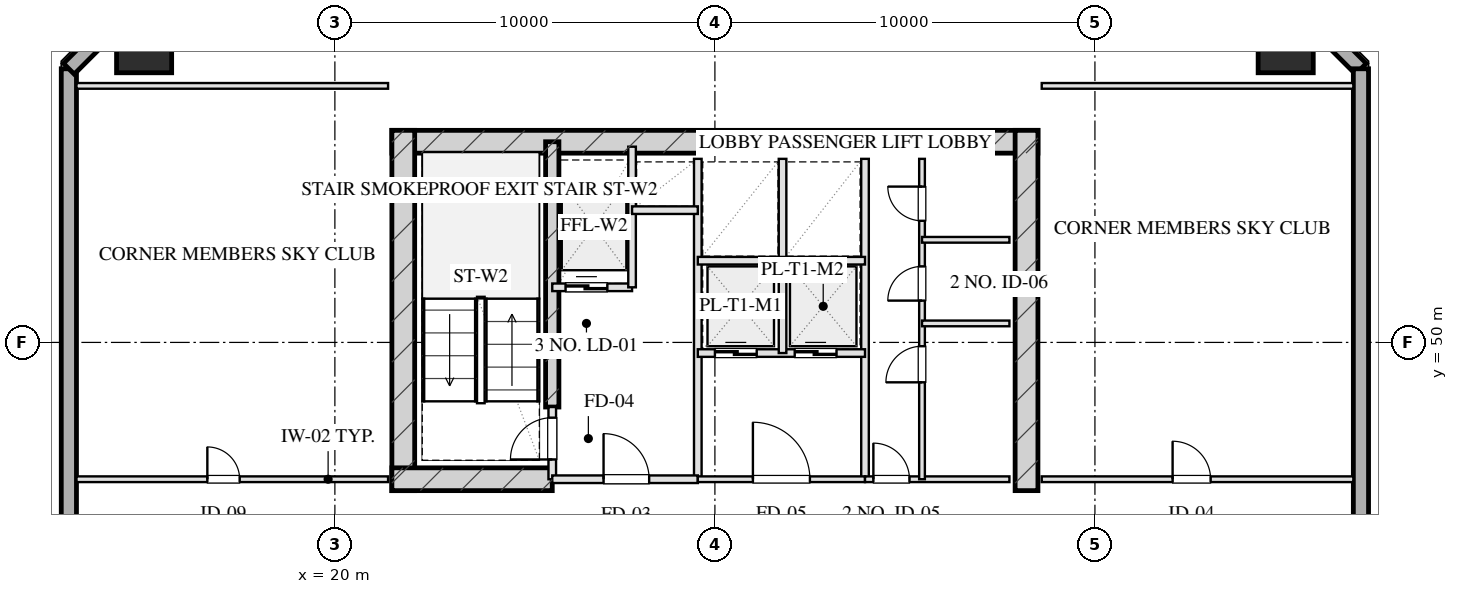
"""IFC4 building model, lengths in metres.
Left out: names, types, materials, properties, quantities, classifications, styles, units other than length and angle.
Written with IfcOpenShell. Run it as: python <this file> out.ifc"""

import sys

from ifc_helpers import new_model, si_unit, direction, frame, frame_2d, origin, origin_2d, place, context, subcontext, project, spatial, rectangle, hollow_rectangle, extrude, element, fill, save


model = new_model("IFC4")
c1 = context("Model", 3, precision=1e-05, world=origin(), true_north=direction((0.0, 1.0)))
c2 = subcontext(c1, "Body", "Model", "MODEL_VIEW")
j1 = project(units=[si_unit("LENGTHUNIT", "METRE"), si_unit("PLANEANGLEUNIT", "RADIAN")], contexts=[c1])
p1 = place(None, origin())
s1 = spatial("IfcSite", under=j1, at=p1, CompositionType="ELEMENT")
p2 = place(p1, origin())
s2 = spatial("IfcBuilding", under=s1, at=p2, CompositionType="ELEMENT")
p3 = place(p2, frame((0.0, 0.0, 159.85)))
s3 = spatial("IfcBuildingStorey", under=s2, at=p3, CompositionType="ELEMENT", Elevation=159.85)
p4 = place(p3, frame((21.5, 55.28, 0.0), z_axis=(0.0, 0.0, 1.0), x_axis=(1.0, 0.0, 0.0)))
e1 = element("IfcWall", 1, at=p4, inside=s3, PredefinedType="SHEAR", context=c2, shape_type="SweptSolid", body=[
    extrude(rectangle(XDim=17.0, YDim=0.6, at=frame_2d((8.5, 0.0))), origin(), (0.0, 0.0, 1.0), 3.45),
])
for number, where, z_axis, x_axis in (
    (2, (21.8, 46.1, 0.0), (0.0, 0.0, 1.0), (0.0, 1.0, 0.0)),
    (3, (38.2, 46.1, 0.0), (0.0, 0.0, 1.0), (0.0, 1.0, 0.0)),
):
    element("IfcWall", number, at=place(p3, frame(where, z_axis=z_axis, x_axis=x_axis)), inside=s3, PredefinedType="SHEAR", context=c2, shape_type="SweptSolid", body=[
        extrude(rectangle(XDim=9.48, YDim=0.6, at=frame_2d((4.74, 0.0))), origin(), (0.0, 0.0, 1.0), 3.45),
    ])
p5 = place(p3, frame((25.72, 48.3, 0.0), z_axis=(0.0, 0.0, 1.0), x_axis=(0.0, 1.0, 0.0)))
e4 = element("IfcWall", 4, at=p5, inside=s3, PredefinedType="SHEAR", context=c2, shape_type="SweptSolid", body=[
    extrude(rectangle(XDim=6.98, YDim=0.35, at=frame_2d((3.49, 0.0))), origin(), (0.0, 0.0, 1.0), 3.45),
])
p6 = place(p3, frame((21.5, 46.4, 0.0), z_axis=(0.0, 0.0, 1.0), x_axis=(1.0, 0.0, 0.0)))
e5 = element("IfcWall", 5, at=p6, inside=s3, PredefinedType="SHEAR", context=c2, shape_type="SweptSolid", body=[
    extrude(rectangle(XDim=4.22, YDim=0.6, at=frame_2d((2.11, 0.0))), origin(), (0.0, 0.0, 1.0), 3.45),
])
for number, where, z_axis, x_axis in (
    (6, (45.02, 57.82, 0.0), (0.0, 0.0, 1.0), (1.0, 0.0, 0.0)),
    (7, (14.98, 57.82, 0.0), (0.0, 0.0, 1.0), (1.0, 0.0, 0.0)),
):
    element("IfcColumn", number, at=place(p3, frame(where, z_axis=z_axis, x_axis=x_axis)), inside=s3, PredefinedType="COLUMN", context=c2, shape_type="SweptSolid", body=[
        extrude(hollow_rectangle(XDim=1.45, YDim=1.45, WallThickness=0.05, at=origin_2d()), origin(), (0.0, 0.0, 1.0), 3.451),
    ])
p7 = place(p3, frame((13.0, 10.8, 0.0), z_axis=(0.0, 0.0, 1.0), x_axis=(0.0, 1.0, 0.0)))
e8 = element("IfcWall", 8, at=p7, inside=s3, PredefinedType="SOLIDWALL", context=c2, shape_type="SweptSolid", body=[
    extrude(rectangle(XDim=46.4, YDim=0.4, at=frame_2d((23.2, 0.0))), origin(), (0.0, 0.0, 1.0), 2.61),
])
p8 = place(p7, frame((15.675, 0.0, 0.75)))
e9 = element("IfcOpeningElement", 9, at=p8, cuts=e8, PredefinedType="OPENING", context=c2, shape_type="SweptSolid", body=[
    extrude(rectangle(XDim=2.25, YDim=1.46, at=frame_2d((1.125, 0.73))), frame((0.0, 0.21, 0.0), z_axis=(0.0, -1.0, 0.0), x_axis=(1.0, 0.0, 0.0)), (0.0, 0.0, 1.0), 0.42),
])
p9 = place(p7, frame((28.475, 0.0, 0.75)))
e10 = element("IfcOpeningElement", 10, at=p9, cuts=e8, PredefinedType="OPENING", context=c2, shape_type="SweptSolid", body=[
    extrude(rectangle(XDim=2.25, YDim=1.46, at=frame_2d((1.125, 0.73))), frame((0.0, 0.21, 0.0), z_axis=(0.0, -1.0, 0.0), x_axis=(1.0, 0.0, 0.0)), (0.0, 0.0, 1.0), 0.42),
])
for number, where, z_axis, x_axis in (
    (11, (13.0, 57.2, 0.0), (0.0, 0.0, 1.0), (0.707, 0.707, 0.0)),
    (12, (44.4, 59.8, 0.0), (0.0, 0.0, 1.0), (0.707, -0.707, 0.0)),
):
    element("IfcWall", number, at=place(p3, frame(where, z_axis=z_axis, x_axis=x_axis)), inside=s3, PredefinedType="SOLIDWALL", context=c2, shape_type="SweptSolid", body=[
        extrude(rectangle(XDim=3.677, YDim=0.4, at=frame_2d((1.838, 0.0))), origin(), (0.0, 0.0, 1.0), 2.61),
    ])
p10 = place(p3, frame((47.0, 57.2, 0.0), z_axis=(0.0, 0.0, 1.0), x_axis=(0.0, -1.0, 0.0)))
e13 = element("IfcWall", 13, at=p10, inside=s3, PredefinedType="SOLIDWALL", context=c2, shape_type="SweptSolid", body=[
    extrude(rectangle(XDim=46.4, YDim=0.4, at=frame_2d((23.2, 0.0))), origin(), (0.0, 0.0, 1.0), 2.61),
])
p11 = place(p3, frame((25.72, 46.4, 0.0), z_axis=(0.0, 0.0, 1.0), x_axis=(0.0, 1.0, 0.0)))
e14 = element("IfcWall", 14, at=p11, inside=s3, PredefinedType="PARTITIONING", context=c2, shape_type="SweptSolid", body=[
    extrude(rectangle(XDim=1.9, YDim=0.2, at=frame_2d((0.95, 0.0))), origin(), (0.0, 0.0, 1.0), 3.175),
])
p12 = place(p11, frame((0.52, 0.0, 0.0)))
e15 = element("IfcOpeningElement", 15, at=p12, cuts=e14, PredefinedType="OPENING", context=c2, shape_type="SweptSolid", body=[
    extrude(rectangle(XDim=1.1, YDim=2.05, at=frame_2d((0.55, 1.025))), frame((0.0, 0.11, 0.0), z_axis=(0.0, -1.0, 0.0), x_axis=(1.0, 0.0, 0.0)), (0.0, 0.0, 1.0), 0.22),
])
p13 = place(p3, frame((29.55, 46.4, 0.0), z_axis=(0.0, 0.0, 1.0), x_axis=(0.0, 1.0, 0.0)))
e16 = element("IfcWall", 16, at=p13, inside=s3, PredefinedType="PARTITIONING", context=c2, shape_type="SweptSolid", body=[
    extrude(rectangle(XDim=8.43, YDim=0.2, at=frame_2d((4.215, 0.0))), origin(), (0.0, 0.0, 1.0), 3.175),
])
p14 = place(p3, frame((25.72, 46.4, 0.0), z_axis=(0.0, 0.0, 1.0), x_axis=(1.0, 0.0, 0.0)))
e17 = element("IfcWall", 17, at=p14, inside=s3, PredefinedType="PARTITIONING", context=c2, shape_type="SweptSolid", body=[
    extrude(rectangle(XDim=3.83, YDim=0.2, at=frame_2d((1.915, 0.0))), origin(), (0.0, 0.0, 1.0), 3.175),
])
p15 = place(p14, frame((1.35, 0.0, 0.0)))
e18 = element("IfcOpeningElement", 18, at=p15, cuts=e17, PredefinedType="OPENING", context=c2, shape_type="SweptSolid", body=[
    extrude(rectangle(XDim=1.2, YDim=2.05, at=frame_2d((0.6, 1.025))), frame((0.0, 0.11, 0.0), z_axis=(0.0, -1.0, 0.0), x_axis=(1.0, 0.0, 0.0)), (0.0, 0.0, 1.0), 0.22),
])
p16 = place(p3, frame((25.72, 51.45, 0.0), z_axis=(0.0, 0.0, 1.0), x_axis=(1.0, 0.0, 0.0)))
e19 = element("IfcWall", 19, at=p16, inside=s3, PredefinedType="PARTITIONING", context=c2, shape_type="SweptSolid", body=[
    extrude(rectangle(XDim=2.1, YDim=0.2, at=frame_2d((1.05, 0.0))), origin(), (0.0, 0.0, 1.0), 3.175),
])
p17 = place(p16, frame((0.35, 0.0, 0.0)))
e20 = element("IfcOpeningElement", 20, at=p17, cuts=e19, PredefinedType="OPENING", context=c2, shape_type="SweptSolid", body=[
    extrude(rectangle(XDim=1.1, YDim=2.05, at=frame_2d((0.55, 1.025))), frame((0.0, 0.11, 0.0), z_axis=(0.0, -1.0, 0.0), x_axis=(1.0, 0.0, 0.0)), (0.0, 0.0, 1.0), 0.22),
])
p18 = place(p3, frame((27.82, 51.45, 0.0), z_axis=(0.0, 0.0, 1.0), x_axis=(0.0, 1.0, 0.0)))
e21 = element("IfcWall", 21, at=p18, inside=s3, PredefinedType="PARTITIONING", context=c2, shape_type="SweptSolid", body=[
    extrude(rectangle(XDim=3.7, YDim=0.2, at=frame_2d((1.85, 0.0))), origin(), (0.0, 0.0, 1.0), 3.175),
])
p19 = place(p3, frame((27.82, 53.48, 0.0), z_axis=(0.0, 0.0, 1.0), x_axis=(1.0, 0.0, 0.0)))
e22 = element("IfcWall", 22, at=p19, inside=s3, PredefinedType="PARTITIONING", context=c2, shape_type="SweptSolid", body=[
    extrude(rectangle(XDim=1.73, YDim=0.2, at=frame_2d((0.865, 0.0))), origin(), (0.0, 0.0, 1.0), 3.175),
])
p20 = place(p3, frame((33.95, 46.4, 0.0), z_axis=(0.0, 0.0, 1.0), x_axis=(0.0, 1.0, 0.0)))
e23 = element("IfcWall", 23, at=p20, inside=s3, PredefinedType="PARTITIONING", context=c2, shape_type="SweptSolid", body=[
    extrude(rectangle(XDim=8.43, YDim=0.2, at=frame_2d((4.215, 0.0))), origin(), (0.0, 0.0, 1.0), 3.175),
])
p21 = place(p3, frame((29.55, 46.4, 0.0), z_axis=(0.0, 0.0, 1.0), x_axis=(1.0, 0.0, 0.0)))
e24 = element("IfcWall", 24, at=p21, inside=s3, PredefinedType="PARTITIONING", context=c2, shape_type="SweptSolid", body=[
    extrude(rectangle(XDim=4.4, YDim=0.15, at=frame_2d((2.2, 0.0))), origin(), (0.0, 0.0, 1.0), 3.175),
])
p22 = place(p21, frame((1.45, 0.0, 0.0)))
e25 = element("IfcOpeningElement", 25, at=p22, cuts=e24, PredefinedType="OPENING", context=c2, shape_type="SweptSolid", body=[
    extrude(rectangle(XDim=1.5, YDim=2.05, at=frame_2d((0.75, 1.025))), frame((0.0, 0.085, 0.0), z_axis=(0.0, -1.0, 0.0), x_axis=(1.0, 0.0, 0.0)), (0.0, 0.0, 1.0), 0.17),
])
p23 = place(p3, frame((29.55, 49.72, 0.0), z_axis=(0.0, 0.0, 1.0), x_axis=(1.0, 0.0, 0.0)))
e26 = element("IfcWall", 26, at=p23, inside=s3, PredefinedType="PARTITIONING", context=c2, shape_type="SweptSolid", body=[
    extrude(rectangle(XDim=4.4, YDim=0.2, at=frame_2d((2.2, 0.0))), origin(), (0.0, 0.0, 1.0), 3.175),
])
p24 = place(p23, frame((0.45, 0.0, 0.0)))
e27 = element("IfcOpeningElement", 27, at=p24, cuts=e26, PredefinedType="OPENING", context=c2, shape_type="SweptSolid", body=[
    extrude(rectangle(XDim=1.1, YDim=2.05, at=frame_2d((0.55, 1.025))), frame((0.0, 0.11, 0.0), z_axis=(0.0, -1.0, 0.0), x_axis=(1.0, 0.0, 0.0)), (0.0, 0.0, 1.0), 0.22),
])
p25 = place(p23, frame((2.55, 0.0, 0.0)))
e28 = element("IfcOpeningElement", 28, at=p25, cuts=e26, PredefinedType="OPENING", context=c2, shape_type="SweptSolid", body=[
    extrude(rectangle(XDim=1.1, YDim=2.05, at=frame_2d((0.55, 1.025))), frame((0.0, 0.11, 0.0), z_axis=(0.0, -1.0, 0.0), x_axis=(1.0, 0.0, 0.0)), (0.0, 0.0, 1.0), 0.22),
])
p26 = place(p3, frame((31.78, 49.72, 0.0), z_axis=(0.0, 0.0, 1.0), x_axis=(0.0, 1.0, 0.0)))
e29 = element("IfcWall", 29, at=p26, inside=s3, PredefinedType="PARTITIONING", context=c2, shape_type="SweptSolid", body=[
    extrude(rectangle(XDim=5.11, YDim=0.2, at=frame_2d((2.555, 0.0))), origin(), (0.0, 0.0, 1.0), 3.175),
])
p27 = place(p3, frame((29.55, 52.15, 0.0), z_axis=(0.0, 0.0, 1.0), x_axis=(1.0, 0.0, 0.0)))
e30 = element("IfcWall", 30, at=p27, inside=s3, PredefinedType="PARTITIONING", context=c2, shape_type="SweptSolid", body=[
    extrude(rectangle(XDim=4.4, YDim=0.2, at=frame_2d((2.2, 0.0))), origin(), (0.0, 0.0, 1.0), 3.175),
])
p28 = place(p3, frame((33.95, 46.4, 0.0), z_axis=(0.0, 0.0, 1.0), x_axis=(1.0, 0.0, 0.0)))
e31 = element("IfcWall", 31, at=p28, inside=s3, PredefinedType="PARTITIONING", context=c2, shape_type="SweptSolid", body=[
    extrude(rectangle(XDim=3.8, YDim=0.15, at=frame_2d((1.9, 0.0))), origin(), (0.0, 0.0, 1.0), 3.175),
])
p29 = place(p28, frame((0.22, 0.0, 0.0)))
e32 = element("IfcOpeningElement", 32, at=p29, cuts=e31, PredefinedType="OPENING", context=c2, shape_type="SweptSolid", body=[
    extrude(rectangle(XDim=0.95, YDim=2.05, at=frame_2d((0.475, 1.025))), frame((0.0, 0.085, 0.0), z_axis=(0.0, -1.0, 0.0), x_axis=(1.0, 0.0, 0.0)), (0.0, 0.0, 1.0), 0.17),
])
p30 = place(p3, frame((35.45, 46.4, 0.0), z_axis=(0.0, 0.0, 1.0), x_axis=(0.0, 1.0, 0.0)))
e33 = element("IfcWall", 33, at=p30, inside=s3, PredefinedType="PARTITIONING", context=c2, shape_type="SweptSolid", body=[
    extrude(rectangle(XDim=8.43, YDim=0.15, at=frame_2d((4.215, 0.0))), origin(), (0.0, 0.0, 1.0), 2.765),
])
p31 = place(p30, frame((2.55, 0.0, 0.0)))
e34 = element("IfcOpeningElement", 34, at=p31, cuts=e33, PredefinedType="OPENING", context=c2, shape_type="SweptSolid", body=[
    extrude(rectangle(XDim=0.95, YDim=2.05, at=frame_2d((0.475, 1.025))), frame((0.0, 0.085, 0.0), z_axis=(0.0, -1.0, 0.0), x_axis=(1.0, 0.0, 0.0)), (0.0, 0.0, 1.0), 0.17),
])
p32 = place(p30, frame((4.7, 0.0, 0.0)))
e35 = element("IfcOpeningElement", 35, at=p32, cuts=e33, PredefinedType="OPENING", context=c2, shape_type="SweptSolid", body=[
    extrude(rectangle(XDim=0.9, YDim=2.05, at=frame_2d((0.45, 1.025))), frame((0.0, 0.085, 0.0), z_axis=(0.0, -1.0, 0.0), x_axis=(1.0, 0.0, 0.0)), (0.0, 0.0, 1.0), 0.17),
])
p33 = place(p30, frame((6.8, 0.0, 0.0)))
e36 = element("IfcOpeningElement", 36, at=p33, cuts=e33, PredefinedType="OPENING", context=c2, shape_type="SweptSolid", body=[
    extrude(rectangle(XDim=0.9, YDim=2.05, at=frame_2d((0.45, 1.025))), frame((0.0, 0.085, 0.0), z_axis=(0.0, -1.0, 0.0), x_axis=(1.0, 0.0, 0.0)), (0.0, 0.0, 1.0), 0.17),
])
for number, where, z_axis, x_axis in (
    (37, (35.45, 50.5, 0.0), (0.0, 0.0, 1.0), (1.0, 0.0, 0.0)),
    (38, (35.45, 52.7, 0.0), (0.0, 0.0, 1.0), (1.0, 0.0, 0.0)),
):
    element("IfcWall", number, at=place(p3, frame(where, z_axis=z_axis, x_axis=x_axis)), inside=s3, PredefinedType="PARTITIONING", context=c2, shape_type="SweptSolid", body=[
        extrude(rectangle(XDim=2.3, YDim=0.15, at=frame_2d((1.15, 0.0))), origin(), (0.0, 0.0, 1.0), 3.175),
    ])
p34 = place(p3, frame((13.2, 56.75, 0.0), z_axis=(0.0, 0.0, 1.0), x_axis=(1.0, 0.0, 0.0)))
e39 = element("IfcWall", 39, at=p34, inside=s3, PredefinedType="PARTITIONING", context=c2, shape_type="SweptSolid", body=[
    extrude(rectangle(XDim=8.2, YDim=0.15, at=frame_2d((4.1, 0.0))), origin(), (0.0, 0.0, 1.0), 3.175),
])
p35 = place(p3, frame((13.2, 46.4, 0.0), z_axis=(0.0, 0.0, 1.0), x_axis=(1.0, 0.0, 0.0)))
e40 = element("IfcWall", 40, at=p35, inside=s3, PredefinedType="PARTITIONING", context=c2, shape_type="SweptSolid", body=[
    extrude(rectangle(XDim=8.2, YDim=0.15, at=frame_2d((4.1, 0.0))), origin(), (0.0, 0.0, 1.0), 3.175),
])
p36 = place(p35, frame((3.444, 0.0, 0.0)))
e41 = element("IfcOpeningElement", 41, at=p36, cuts=e40, PredefinedType="OPENING", context=c2, shape_type="SweptSolid", body=[
    extrude(rectangle(XDim=0.85, YDim=2.05, at=frame_2d((0.425, 1.025))), frame((0.0, 0.085, 0.0), z_axis=(0.0, -1.0, 0.0), x_axis=(1.0, 0.0, 0.0)), (0.0, 0.0, 1.0), 0.17),
])
p37 = place(p3, frame((38.6, 56.75, 0.0), z_axis=(0.0, 0.0, 1.0), x_axis=(1.0, 0.0, 0.0)))
e42 = element("IfcWall", 42, at=p37, inside=s3, PredefinedType="PARTITIONING", context=c2, shape_type="SweptSolid", body=[
    extrude(rectangle(XDim=8.2, YDim=0.15, at=frame_2d((4.1, 0.0))), origin(), (0.0, 0.0, 1.0), 3.175),
])
p38 = place(p3, frame((38.6, 46.4, 0.0), z_axis=(0.0, 0.0, 1.0), x_axis=(1.0, 0.0, 0.0)))
e43 = element("IfcWall", 43, at=p38, inside=s3, PredefinedType="PARTITIONING", context=c2, shape_type="SweptSolid", body=[
    extrude(rectangle(XDim=8.2, YDim=0.15, at=frame_2d((4.1, 0.0))), origin(), (0.0, 0.0, 1.0), 3.175),
])
p39 = place(p38, frame((3.444, 0.0, 0.0)))
e44 = element("IfcOpeningElement", 44, at=p39, cuts=e43, PredefinedType="OPENING", context=c2, shape_type="SweptSolid", body=[
    extrude(rectangle(XDim=1.0, YDim=2.05, at=frame_2d((0.5, 1.025))), frame((0.0, 0.085, 0.0), z_axis=(0.0, -1.0, 0.0), x_axis=(1.0, 0.0, 0.0)), (0.0, 0.0, 1.0), 0.17),
])
p40 = place(p12, origin())
e45 = element("IfcDoor", 45, at=p40, inside=s3, OperationType="SINGLE_SWING_LEFT", PredefinedType="DOOR", context=c2, shape_type="SweptSolid", body=[
    extrude(rectangle(XDim=1.1, YDim=2.05, at=frame_2d((0.55, 1.025))), frame((0.0, 0.025, 0.0), z_axis=(0.0, -1.0, 0.0), x_axis=(1.0, 0.0, 0.0)), (0.0, 0.0, 1.0), 0.05),
])
fill(e15, e45)
p41 = place(p15, origin())
e46 = element("IfcDoor", 46, at=p41, inside=s3, OperationType="SINGLE_SWING_LEFT", PredefinedType="DOOR", context=c2, shape_type="SweptSolid", body=[
    extrude(rectangle(XDim=1.2, YDim=2.05, at=frame_2d((0.6, 1.025))), frame((0.0, 0.025, 0.0), z_axis=(0.0, -1.0, 0.0), x_axis=(1.0, 0.0, 0.0)), (0.0, 0.0, 1.0), 0.05),
])
fill(e18, e46)
p42 = place(p17, origin())
e47 = element("IfcDoor", 47, at=p42, inside=s3, OperationType="DOUBLE_DOOR_SLIDING", PredefinedType="DOOR", context=c2, shape_type="SweptSolid", body=[
    extrude(rectangle(XDim=1.1, YDim=2.05, at=frame_2d((0.55, 1.025))), frame((0.0, 0.025, 0.0), z_axis=(0.0, -1.0, 0.0), x_axis=(1.0, 0.0, 0.0)), (0.0, 0.0, 1.0), 0.05),
])
fill(e20, e47)
p43 = place(p22, origin())
e48 = element("IfcDoor", 48, at=p43, inside=s3, OperationType="SINGLE_SWING_LEFT", PredefinedType="DOOR", context=c2, shape_type="SweptSolid", body=[
    extrude(rectangle(XDim=1.5, YDim=2.05, at=frame_2d((0.75, 1.025))), frame((0.0, 0.025, 0.0), z_axis=(0.0, -1.0, 0.0), x_axis=(1.0, 0.0, 0.0)), (0.0, 0.0, 1.0), 0.05),
])
fill(e25, e48)
p44 = place(p24, origin())
e49 = element("IfcDoor", 49, at=p44, inside=s3, OperationType="DOUBLE_DOOR_SLIDING", PredefinedType="DOOR", context=c2, shape_type="SweptSolid", body=[
    extrude(rectangle(XDim=1.1, YDim=2.05, at=frame_2d((0.55, 1.025))), frame((0.0, 0.025, 0.0), z_axis=(0.0, -1.0, 0.0), x_axis=(1.0, 0.0, 0.0)), (0.0, 0.0, 1.0), 0.05),
])
fill(e27, e49)
p45 = place(p25, origin())
e50 = element("IfcDoor", 50, at=p45, inside=s3, OperationType="DOUBLE_DOOR_SLIDING", PredefinedType="DOOR", context=c2, shape_type="SweptSolid", body=[
    extrude(rectangle(XDim=1.1, YDim=2.05, at=frame_2d((0.55, 1.025))), frame((0.0, 0.025, 0.0), z_axis=(0.0, -1.0, 0.0), x_axis=(1.0, 0.0, 0.0)), (0.0, 0.0, 1.0), 0.05),
])
fill(e28, e50)
p46 = place(p29, origin())
e51 = element("IfcDoor", 51, at=p46, inside=s3, OperationType="SINGLE_SWING_LEFT", PredefinedType="DOOR", context=c2, shape_type="SweptSolid", body=[
    extrude(rectangle(XDim=0.95, YDim=2.05, at=frame_2d((0.475, 1.025))), frame((0.0, 0.025, 0.0), z_axis=(0.0, -1.0, 0.0), x_axis=(1.0, 0.0, 0.0)), (0.0, 0.0, 1.0), 0.05),
])
fill(e32, e51)
p47 = place(p31, origin())
e52 = element("IfcDoor", 52, at=p47, inside=s3, OperationType="SINGLE_SWING_LEFT", PredefinedType="DOOR", context=c2, shape_type="SweptSolid", body=[
    extrude(rectangle(XDim=0.95, YDim=2.05, at=frame_2d((0.475, 1.025))), frame((0.0, 0.025, 0.0), z_axis=(0.0, -1.0, 0.0), x_axis=(1.0, 0.0, 0.0)), (0.0, 0.0, 1.0), 0.05),
])
fill(e34, e52)
p48 = place(p32, origin())
e53 = element("IfcDoor", 53, at=p48, inside=s3, OperationType="SINGLE_SWING_LEFT", PredefinedType="DOOR", context=c2, shape_type="SweptSolid", body=[
    extrude(rectangle(XDim=0.9, YDim=2.05, at=frame_2d((0.45, 1.025))), frame((0.0, 0.025, 0.0), z_axis=(0.0, -1.0, 0.0), x_axis=(1.0, 0.0, 0.0)), (0.0, 0.0, 1.0), 0.05),
])
fill(e35, e53)
p49 = place(p33, origin())
e54 = element("IfcDoor", 54, at=p49, inside=s3, OperationType="SINGLE_SWING_RIGHT", PredefinedType="DOOR", context=c2, shape_type="SweptSolid", body=[
    extrude(rectangle(XDim=0.9, YDim=2.05, at=frame_2d((0.45, 1.025))), frame((0.0, 0.025, 0.0), z_axis=(0.0, -1.0, 0.0), x_axis=(1.0, 0.0, 0.0)), (0.0, 0.0, 1.0), 0.05),
])
fill(e36, e54)
p50 = place(p36, origin())
e55 = element("IfcDoor", 55, at=p50, inside=s3, OperationType="SINGLE_SWING_LEFT", PredefinedType="DOOR", context=c2, shape_type="SweptSolid", body=[
    extrude(rectangle(XDim=0.85, YDim=2.05, at=frame_2d((0.425, 1.025))), frame((0.0, 0.025, 0.0), z_axis=(0.0, -1.0, 0.0), x_axis=(1.0, 0.0, 0.0)), (0.0, 0.0, 1.0), 0.05),
])
fill(e41, e55)
p51 = place(p39, origin())
e56 = element("IfcDoor", 56, at=p51, inside=s3, OperationType="SINGLE_SWING_LEFT", PredefinedType="DOOR", context=c2, shape_type="SweptSolid", body=[
    extrude(rectangle(XDim=1.0, YDim=2.05, at=frame_2d((0.5, 1.025))), frame((0.0, 0.025, 0.0), z_axis=(0.0, -1.0, 0.0), x_axis=(1.0, 0.0, 0.0)), (0.0, 0.0, 1.0), 0.05),
])
fill(e44, e56)
save(model, sys.argv[1])
